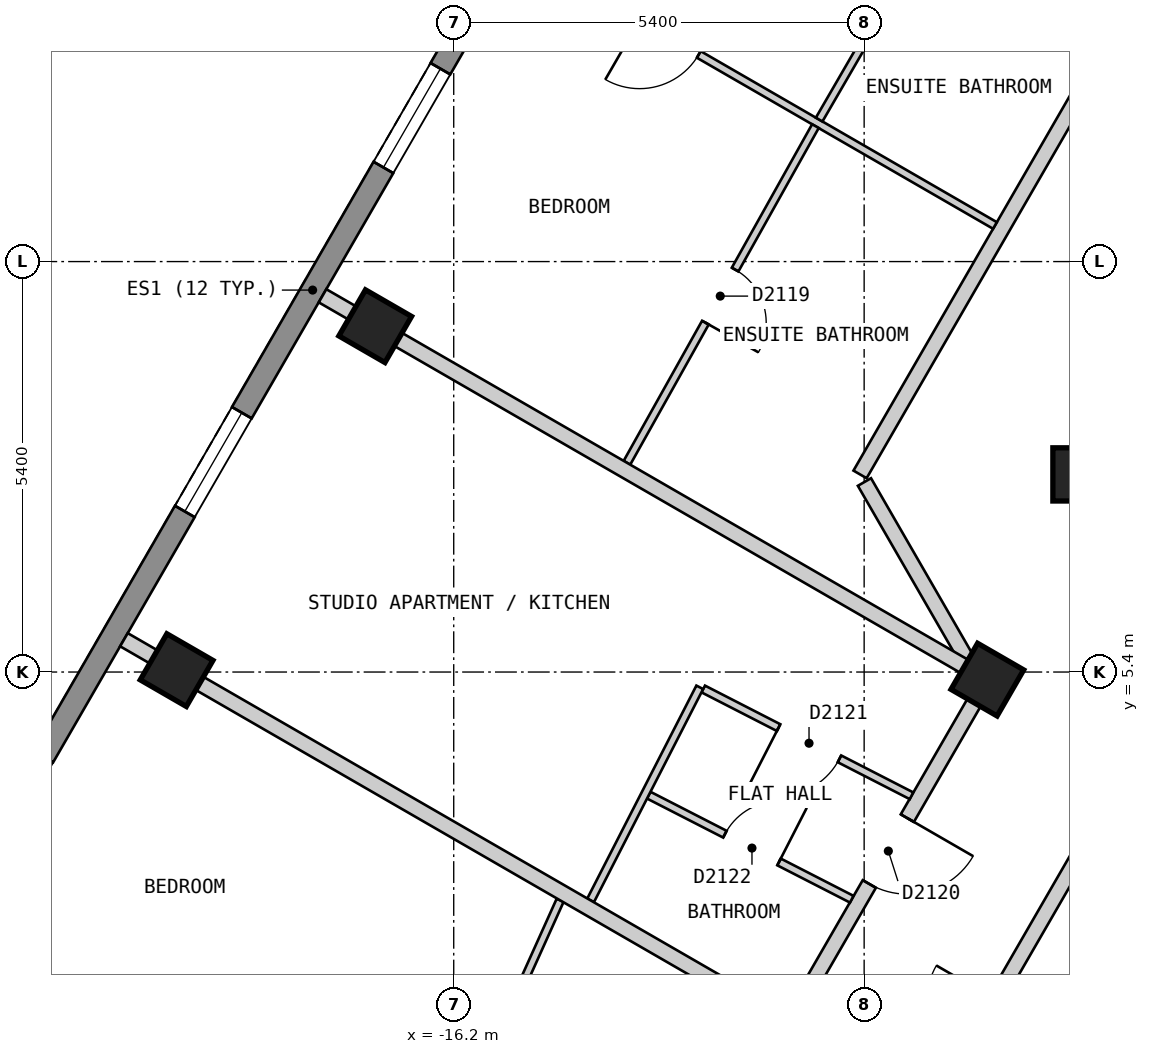
"""IFC4 building model, lengths in metres.
Left out: names, types, materials, properties, quantities, classifications, styles, units other than length and angle.
Written with IfcOpenShell. Run it as: python <this file> out.ifc"""

import sys

from ifc_helpers import new_model, si_unit, direction, frame, frame_2d, origin, origin_2d, place, context, subcontext, project, spatial, polyline, rectangle, outline, extrude, element, fill, save


model = new_model("IFC4")
c1 = context("Model", 3, precision=1e-05, world=origin(), true_north=direction((0.0, 1.0)))
c2 = subcontext(c1, "Body", "Model", "MODEL_VIEW")
j1 = project(units=[si_unit("LENGTHUNIT", "METRE"), si_unit("PLANEANGLEUNIT", "RADIAN")], contexts=[c1])
p1 = place(None, origin())
s1 = spatial("IfcSite", under=j1, at=p1, CompositionType="ELEMENT")
p2 = place(p1, origin())
s2 = spatial("IfcBuilding", under=s1, at=p2, CompositionType="ELEMENT")
p3 = place(p2, frame((0.0, 0.0, 205.8)))
s3 = spatial("IfcBuildingStorey", under=s2, at=p3, CompositionType="ELEMENT", Elevation=205.8)
for number, where, z_axis, x_axis in (
    (1, (-17.233, 9.95, 0.0), (0.0, 0.0, 1.0), (-0.5, -0.866, 0.0)),
    (2, (-19.846, 5.425, 0.0), (0.0, 0.0, 1.0), (-0.5, -0.866, 0.0)),
    (3, (-7.967, 8.0, 0.0), (0.0, 0.0, 1.0), (1.0, 0.0, 0.0)),
    (4, (-9.179, 5.3, 0.0), (0.0, 0.0, 1.0), (-0.5, -0.866, 0.0)),
):
    element("IfcColumn", number, at=place(p3, frame(where, z_axis=z_axis, x_axis=x_axis)), inside=s3, PredefinedType="COLUMN", context=c2, shape_type="SweptSolid", body=[
        extrude(rectangle(XDim=0.7, YDim=0.7, at=origin_2d()), origin(), (0.0, 0.0, 1.0), 3.0),
    ])
p4 = place(p3, frame((-12.514, 20.025, 0.0), z_axis=(0.0, 0.0, 1.0), x_axis=(-0.500003656944, -0.866023292436, 0.0)))
e5 = element("IfcWall", 5, at=p4, inside=s3, PredefinedType="SOLIDWALL", context=c2, shape_type="SweptSolid", body=[
    extrude(outline(polyline([(0.0, -0.15), (22.17, -0.15), (22.09, 0.15), (0.08, 0.15), (0.0, -0.15)])), origin(), (0.0, 0.0, 1.0), 2.7),
])
p5 = place(p4, frame((2.497, 0.0, 0.15)))
e6 = element("IfcOpeningElement", 6, at=p5, cuts=e5, PredefinedType="OPENING", context=c2, shape_type="SweptSolid", body=[
    extrude(rectangle(XDim=1.5, YDim=2.1, at=frame_2d((0.75, 1.05))), frame((0.0, 0.16, 0.0), z_axis=(0.0, -1.0, 0.0), x_axis=(1.0, 0.0, 0.0)), (0.0, 0.0, 1.0), 0.32),
])
p6 = place(p4, frame((7.722, 0.0, 0.15)))
e7 = element("IfcOpeningElement", 7, at=p6, cuts=e5, PredefinedType="OPENING", context=c2, shape_type="SweptSolid", body=[
    extrude(rectangle(XDim=1.5, YDim=2.1, at=frame_2d((0.75, 1.05))), frame((0.0, 0.16, 0.0), z_axis=(0.0, -1.0, 0.0), x_axis=(1.0, 0.0, 0.0)), (0.0, 0.0, 1.0), 0.32),
])
p7 = place(p4, frame((12.948, 0.0, 0.15)))
e8 = element("IfcOpeningElement", 8, at=p7, cuts=e5, PredefinedType="OPENING", context=c2, shape_type="SweptSolid", body=[
    extrude(rectangle(XDim=1.5, YDim=2.1, at=frame_2d((0.75, 1.05))), frame((0.0, 0.16, 0.0), z_axis=(0.0, -1.0, 0.0), x_axis=(1.0, 0.0, 0.0)), (0.0, 0.0, 1.0), 0.32),
])
p8 = place(p4, frame((18.173, 0.0, 0.15)))
e9 = element("IfcOpeningElement", 9, at=p8, cuts=e5, PredefinedType="OPENING", context=c2, shape_type="SweptSolid", body=[
    extrude(rectangle(XDim=1.5, YDim=2.1, at=frame_2d((0.75, 1.05))), frame((0.0, 0.16, 0.0), z_axis=(0.0, -1.0, 0.0), x_axis=(1.0, 0.0, 0.0)), (0.0, 0.0, 1.0), 0.32),
])
p9 = place(p3, frame((-10.796, 7.9, 0.0), z_axis=(0.0, 0.0, 1.0), x_axis=(0.499698840221, -0.866199208659, 0.0)))
e10 = element("IfcWall", 10, at=p9, inside=s3, PredefinedType="PARTITIONING", context=c2, shape_type="SweptSolid", body=[
    extrude(rectangle(XDim=2.685, YDim=0.2, at=frame_2d((1.343, 0.0))), origin(), (0.0, 0.0, 1.0), 2.7),
])
p10 = place(p3, frame((-10.623, -1.6, 0.0), z_axis=(0.0, 0.0, 1.0), x_axis=(0.500040865889, 0.866001808567, 0.0)))
e11 = element("IfcWall", 11, at=p10, inside=s3, PredefinedType="PARTITIONING", context=c2, shape_type="SweptSolid", body=[
    extrude(rectangle(XDim=5.31, YDim=0.2, at=frame_2d((2.655, 0.0))), origin(), (0.0, 0.0, 1.0), 2.7),
])
p11 = place(p10, frame((2.205, 0.0, 0.0)))
e12 = element("IfcOpeningElement", 12, at=p11, cuts=e11, PredefinedType="OPENING", context=c2, shape_type="SweptSolid", body=[
    extrude(rectangle(XDim=0.9, YDim=2.1, at=frame_2d((0.45, 1.05))), frame((0.0, 0.11, 0.0), z_axis=(0.0, -1.0, 0.0), x_axis=(1.0, 0.0, 0.0)), (0.0, 0.0, 1.0), 0.22),
])
p12 = place(p3, frame((-13.106, -1.5, 0.0), z_axis=(0.0, 0.0, 1.0), x_axis=(0.500025705601, 0.86601056214, 0.0)))
e13 = element("IfcWall", 13, at=p12, inside=s3, PredefinedType="PARTITIONING", context=c2, shape_type="SweptSolid", body=[
    extrude(rectangle(XDim=7.735, YDim=0.2, at=frame_2d((3.868, 0.0))), origin(), (0.0, 0.0, 1.0), 2.7),
])
p13 = place(p12, frame((4.748, 0.0, 0.0)))
e14 = element("IfcOpeningElement", 14, at=p13, cuts=e13, PredefinedType="OPENING", context=c2, shape_type="SweptSolid", body=[
    extrude(rectangle(XDim=1.0, YDim=2.1, at=frame_2d((0.5, 1.05))), frame((0.0, 0.11, 0.0), z_axis=(0.0, -1.0, 0.0), x_axis=(1.0, 0.0, 0.0)), (0.0, 0.0, 1.0), 0.22),
])
p14 = place(p3, frame((-10.854, 8.0, 0.0), z_axis=(0.0, 0.0, 1.0), x_axis=(0.499997637144, 0.866026767976, 0.0)))
e15 = element("IfcWall", 15, at=p14, inside=s3, PredefinedType="PARTITIONING", context=c2, shape_type="SweptSolid", body=[
    extrude(rectangle(XDim=10.854, YDim=0.2, at=frame_2d((5.427, 0.0))), origin(), (0.0, 0.0, 1.0), 2.7),
])
p15 = place(p14, frame((9.754, 0.0, 0.0)))
e16 = element("IfcOpeningElement", 16, at=p15, cuts=e15, PredefinedType="OPENING", context=c2, shape_type="SweptSolid", body=[
    extrude(rectangle(XDim=1.0, YDim=2.1, at=frame_2d((0.5, 1.05))), frame((0.0, 0.11, 0.0), z_axis=(0.0, -1.0, 0.0), x_axis=(1.0, 0.0, 0.0)), (0.0, 0.0, 1.0), 0.22),
])
p16 = place(p3, frame((-12.917, 5.177, 0.0), z_axis=(0.0, 0.0, 1.0), x_axis=(0.889829844516, -0.456292502467, 0.0)))
e17 = element("IfcWall", 17, at=p16, inside=s3, PredefinedType="PARTITIONING", context=c2, shape_type="SweptSolid", body=[
    extrude(rectangle(XDim=3.079, YDim=0.1, at=frame_2d((1.54, 0.0))), origin(), (0.0, 0.0, 1.0), 2.7),
])
p17 = place(p16, frame((1.114, 0.0, 0.0)))
e18 = element("IfcOpeningElement", 18, at=p17, cuts=e17, PredefinedType="OPENING", context=c2, shape_type="SweptSolid", body=[
    extrude(rectangle(XDim=0.9, YDim=2.1, at=frame_2d((0.45, 1.05))), frame((0.0, 0.06, 0.0), z_axis=(0.0, -1.0, 0.0), x_axis=(1.0, 0.0, 0.0)), (0.0, 0.0, 1.0), 0.12),
])
p18 = place(p3, frame((-13.634, 3.78, 0.0), z_axis=(0.0, 0.0, 1.0), x_axis=(0.889908901513, -0.456138298116, 0.0)))
e19 = element("IfcWall", 19, at=p18, inside=s3, PredefinedType="PARTITIONING", context=c2, shape_type="SweptSolid", body=[
    extrude(rectangle(XDim=3.002, YDim=0.1, at=frame_2d((1.501, 0.0))), origin(), (0.0, 0.0, 1.0), 2.7),
])
p19 = place(p18, frame((1.126, 0.0, 0.0)))
e20 = element("IfcOpeningElement", 20, at=p19, cuts=e19, PredefinedType="OPENING", context=c2, shape_type="SweptSolid", body=[
    extrude(rectangle(XDim=0.8, YDim=2.1, at=frame_2d((0.4, 1.05))), frame((0.0, 0.06, 0.0), z_axis=(0.0, -1.0, 0.0), x_axis=(1.0, 0.0, 0.0)), (0.0, 0.0, 1.0), 0.12),
])
p20 = place(p3, frame((-15.314, 14.875, 0.0), z_axis=(0.0, 0.0, 1.0), x_axis=(0.866001485781, -0.500041424909, 0.0)))
e21 = element("IfcWall", 21, at=p20, inside=s3, PredefinedType="PARTITIONING", context=c2, shape_type="SweptSolid", body=[
    extrude(rectangle(XDim=7.2, YDim=0.1, at=frame_2d((3.6, 0.0))), origin(), (0.0, 0.0, 1.0), 2.7),
])
p21 = place(p20, frame((1.8, 0.0, 0.0)))
e22 = element("IfcOpeningElement", 22, at=p21, cuts=e21, PredefinedType="OPENING", context=c2, shape_type="SweptSolid", body=[
    extrude(rectangle(XDim=0.9, YDim=2.1, at=frame_2d((0.45, 1.05))), frame((0.0, 0.06, 0.0), z_axis=(0.0, -1.0, 0.0), x_axis=(1.0, 0.0, 0.0)), (0.0, 0.0, 1.0), 0.12),
])
p22 = place(p3, frame((-15.575, 0.677, 0.0), z_axis=(0.0, 0.0, 1.0), x_axis=(0.410768223147, 0.911739802165, 0.0)))
e23 = element("IfcWall", 23, at=p22, inside=s3, PredefinedType="PARTITIONING", context=c2, shape_type="SweptSolid", body=[
    extrude(rectangle(XDim=1.886, YDim=0.1, at=frame_2d((0.943, 0.0))), origin(), (0.0, 0.0, 1.0), 2.7),
])
p23 = place(p3, frame((-11.392, 12.668, 0.0), z_axis=(0.0, 0.0, 1.0), x_axis=(0.501440551074, 0.865192102217, 0.0)))
e24 = element("IfcWall", 24, at=p23, inside=s3, PredefinedType="PARTITIONING", context=c2, shape_type="SweptSolid", body=[
    extrude(rectangle(XDim=7.307, YDim=0.1, at=frame_2d((3.654, 0.0))), origin(), (0.0, 0.0, 1.0), 2.7),
])
p24 = place(p23, frame((3.278, 0.0, 0.0)))
e25 = element("IfcOpeningElement", 25, at=p24, cuts=e24, PredefinedType="OPENING", context=c2, shape_type="SweptSolid", body=[
    extrude(rectangle(XDim=0.8, YDim=2.1, at=frame_2d((0.4, 1.05))), frame((0.0, 0.06, 0.0), z_axis=(0.0, -1.0, 0.0), x_axis=(1.0, 0.0, 0.0)), (0.0, 0.0, 1.0), 0.12),
])
p25 = place(p3, frame((-13.921, 8.153, 0.0), z_axis=(0.0, 0.0, 1.0), x_axis=(0.488568218554, 0.872525699231, 0.0)))
e26 = element("IfcWall", 26, at=p25, inside=s3, PredefinedType="PARTITIONING", context=c2, shape_type="SweptSolid", body=[
    extrude(rectangle(XDim=5.076, YDim=0.1, at=frame_2d((2.538, 0.0))), origin(), (0.0, 0.0, 1.0), 2.7),
])
p26 = place(p25, frame((2.113, 0.0, 0.0)))
e27 = element("IfcOpeningElement", 27, at=p26, cuts=e26, PredefinedType="OPENING", context=c2, shape_type="SweptSolid", body=[
    extrude(rectangle(XDim=0.8, YDim=2.1, at=frame_2d((0.4, 1.05))), frame((0.0, 0.06, 0.0), z_axis=(0.0, -1.0, 0.0), x_axis=(1.0, 0.0, 0.0)), (0.0, 0.0, 1.0), 0.12),
])
p27 = place(p3, frame((-14.399, 2.396, 0.0), z_axis=(0.0, 0.0, 1.0), x_axis=(0.455967231787, 0.889996563778, 0.0)))
e28 = element("IfcWall", 28, at=p27, inside=s3, PredefinedType="PARTITIONING", context=c2, shape_type="SweptSolid", body=[
    extrude(rectangle(XDim=3.149, YDim=0.1, at=frame_2d((1.575, 0.0))), origin(), (0.0, 0.0, 1.0), 2.7),
])
p28 = place(p3, frame((-20.539, 5.825, 0.0), z_axis=(0.0, 0.0, 1.0), x_axis=(0.866046068403, -0.499964206122, 0.0)))
e29 = element("IfcWall", 29, at=p28, inside=s3, PredefinedType="PARTITIONING", context=c2, shape_type="SweptSolid", body=[
    extrude(rectangle(XDim=9.995, YDim=0.2, at=frame_2d((4.998, 0.0))), origin(), (0.0, 0.0, 1.0), 2.7),
])
p29 = place(p3, frame((-17.926, 10.35, 0.0), z_axis=(0.0, 0.0, 1.0), x_axis=(0.866018411306, -0.500012111133, 0.0)))
e30 = element("IfcWall", 30, at=p29, inside=s3, PredefinedType="PARTITIONING", context=c2, shape_type="SweptSolid", body=[
    extrude(rectangle(XDim=9.898, YDim=0.2, at=frame_2d((4.949, 0.0))), origin(), (0.0, 0.0, 1.0), 2.7),
])
p30 = place(p6, origin())
e31 = element("IfcWindow", 31, at=p30, inside=s3, PartitioningType="SINGLE_PANEL", PredefinedType="WINDOW", context=c2, shape_type="SweptSolid", body=[
    extrude(rectangle(XDim=1.5, YDim=2.1, at=frame_2d((0.75, 1.05))), frame((0.0, 0.03, 0.0), z_axis=(0.0, -1.0, 0.0), x_axis=(1.0, 0.0, 0.0)), (0.0, 0.0, 1.0), 0.06),
])
fill(e7, e31)
p31 = place(p7, origin())
e32 = element("IfcWindow", 32, at=p31, inside=s3, PartitioningType="SINGLE_PANEL", PredefinedType="WINDOW", context=c2, shape_type="SweptSolid", body=[
    extrude(rectangle(XDim=1.5, YDim=2.1, at=frame_2d((0.75, 1.05))), frame((0.0, 0.03, 0.0), z_axis=(0.0, -1.0, 0.0), x_axis=(1.0, 0.0, 0.0)), (0.0, 0.0, 1.0), 0.06),
])
fill(e8, e32)
p32 = place(p21, origin())
e33 = element("IfcDoor", 33, at=p32, inside=s3, OperationType="SINGLE_SWING_LEFT", PredefinedType="DOOR", context=c2, shape_type="SweptSolid", body=[
    extrude(rectangle(XDim=0.9, YDim=2.1, at=frame_2d((0.45, 1.05))), frame((0.0, 0.025, 0.0), z_axis=(0.0, -1.0, 0.0), x_axis=(1.0, 0.0, 0.0)), (0.0, 0.0, 1.0), 0.05),
])
fill(e22, e33)
p33 = place(p26, origin())
e34 = element("IfcDoor", 34, at=p33, inside=s3, OperationType="SINGLE_SWING_LEFT", PredefinedType="DOOR", context=c2, shape_type="SweptSolid", body=[
    extrude(rectangle(XDim=0.8, YDim=2.1, at=frame_2d((0.4, 1.05))), frame((0.0, 0.025, 0.0), z_axis=(0.0, -1.0, 0.0), x_axis=(1.0, 0.0, 0.0)), (0.0, 0.0, 1.0), 0.05),
])
fill(e27, e34)
p34 = place(p13, origin())
e35 = element("IfcDoor", 35, at=p34, inside=s3, OperationType="SINGLE_SWING_RIGHT", PredefinedType="DOOR", context=c2, shape_type="SweptSolid", body=[
    extrude(rectangle(XDim=1.0, YDim=2.1, at=frame_2d((0.5, 1.05))), frame((0.0, 0.025, 0.0), z_axis=(0.0, -1.0, 0.0), x_axis=(1.0, 0.0, 0.0)), (0.0, 0.0, 1.0), 0.05),
])
fill(e14, e35)
p35 = place(p17, origin())
e36 = element("IfcDoor", 36, at=p35, inside=s3, OperationType="SINGLE_SWING_LEFT", PredefinedType="DOOR", context=c2, shape_type="SweptSolid", body=[
    extrude(rectangle(XDim=0.9, YDim=2.1, at=frame_2d((0.45, 1.05))), frame((0.0, 0.025, 0.0), z_axis=(0.0, -1.0, 0.0), x_axis=(1.0, 0.0, 0.0)), (0.0, 0.0, 1.0), 0.05),
])
fill(e18, e36)
p36 = place(p19, origin())
e37 = element("IfcDoor", 37, at=p36, inside=s3, OperationType="SINGLE_SWING_RIGHT", PredefinedType="DOOR", context=c2, shape_type="SweptSolid", body=[
    extrude(rectangle(XDim=0.8, YDim=2.1, at=frame_2d((0.4, 1.05))), frame((0.0, 0.025, 0.0), z_axis=(0.0, -1.0, 0.0), x_axis=(1.0, 0.0, 0.0)), (0.0, 0.0, 1.0), 0.05),
])
fill(e20, e37)
save(model, sys.argv[1])
